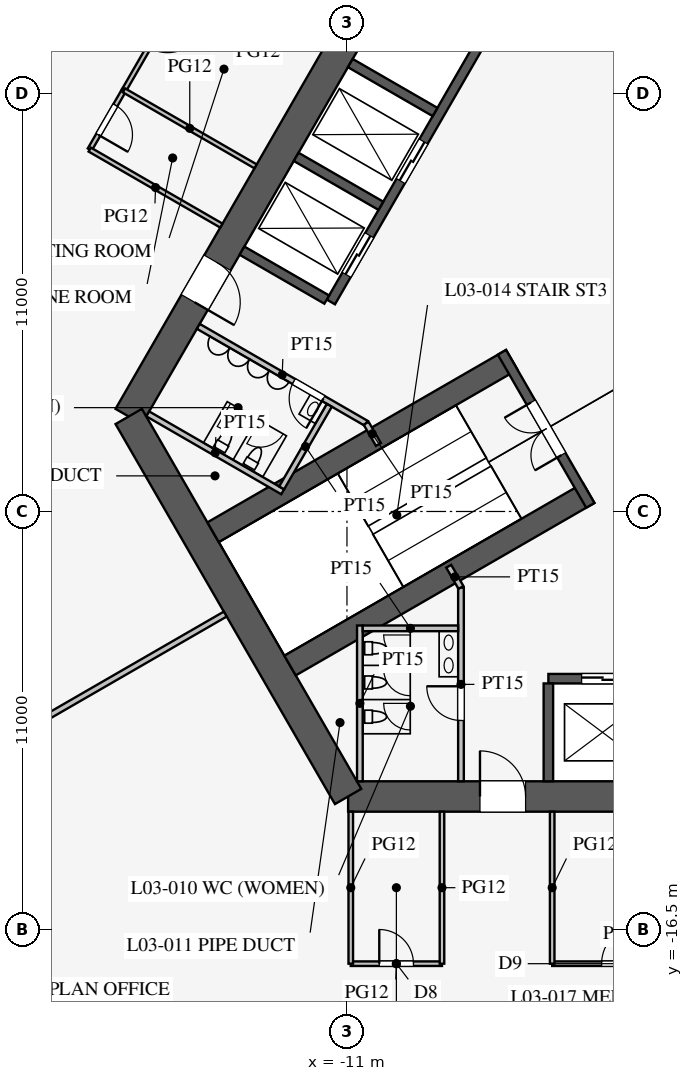
"""IFC4 building model, lengths in metres.
Left out: names, types, materials, properties, quantities, classifications, styles, units other than length and angle.
Written with IfcOpenShell. Run it as: python <this file> out.ifc"""

import sys

from ifc_helpers import new_model, si_unit, direction, frame, frame_2d, origin, place, context, subcontext, project, spatial, rectangle, extrude, element, fill, save


model = new_model("IFC4")
c1 = context("Model", 3, precision=1e-05, world=origin(), true_north=direction((0.0, 1.0)))
c2 = subcontext(c1, "Body", "Model", "MODEL_VIEW")
j1 = project(units=[si_unit("LENGTHUNIT", "METRE"), si_unit("PLANEANGLEUNIT", "RADIAN")], contexts=[c1])
p1 = place(None, origin())
s1 = spatial("IfcSite", under=j1, at=p1, CompositionType="ELEMENT")
p2 = place(p1, origin())
s2 = spatial("IfcBuilding", under=s1, at=p2, CompositionType="ELEMENT")
p3 = place(p2, frame((0.0, 0.0, 16.5)))
s3 = spatial("IfcBuildingStorey", under=s2, at=p3, CompositionType="ELEMENT", Elevation=16.5)
p4 = place(p3, frame((-10.97, -13.0, 0.0), z_axis=(0.0, 0.0, 1.0), x_axis=(1.0, 0.0, 0.0)))
e1 = element("IfcWall", 1, at=p4, inside=s3, PredefinedType="SHEAR", context=c2, shape_type="SweptSolid", body=[
    extrude(rectangle(XDim=21.939, YDim=0.8, at=frame_2d((10.97, 0.0))), origin(), (0.0, 0.0, 1.0), 4.2),
])
p5 = place(p4, frame((17.27, 0.0, 0.0)))
e2 = element("IfcOpeningElement", 2, at=p5, cuts=e1, PredefinedType="OPENING", context=c2, shape_type="SweptSolid", body=[
    extrude(rectangle(XDim=1.2, YDim=2.1, at=frame_2d((0.6, 1.05))), frame((0.0, 0.41, 0.0), z_axis=(0.0, -1.0, 0.0), x_axis=(1.0, 0.0, 0.0)), (0.0, 0.0, 1.0), 0.82),
])
p6 = place(p4, frame((3.47, 0.0, 0.0)))
e3 = element("IfcOpeningElement", 3, at=p6, cuts=e1, PredefinedType="OPENING", context=c2, shape_type="SweptSolid", body=[
    extrude(rectangle(XDim=1.2, YDim=2.1, at=frame_2d((0.6, 1.05))), frame((0.0, 0.41, 0.0), z_axis=(0.0, -1.0, 0.0), x_axis=(1.0, 0.0, 0.0)), (0.0, 0.0, 1.0), 0.82),
])
p7 = place(p3, frame((-5.773, 16.0, 0.0), z_axis=(0.0, 0.0, 1.0), x_axis=(-0.500002442456, -0.866023993627, 0.0)))
e4 = element("IfcWall", 4, at=p7, inside=s3, PredefinedType="SHEAR", context=c2, shape_type="SweptSolid", body=[
    extrude(rectangle(XDim=21.939, YDim=0.8, at=frame_2d((10.97, 0.0))), origin(), (0.0, 0.0, 1.0), 4.2),
])
p8 = place(p7, frame((17.27, 0.0, 0.0)))
e5 = element("IfcOpeningElement", 5, at=p8, cuts=e4, PredefinedType="OPENING", context=c2, shape_type="SweptSolid", body=[
    extrude(rectangle(XDim=1.2, YDim=2.1, at=frame_2d((0.6, 1.05))), frame((0.0, 0.41, 0.0), z_axis=(0.0, -1.0, 0.0), x_axis=(1.0, 0.0, 0.0)), (0.0, 0.0, 1.0), 0.82),
])
p9 = place(p7, frame((3.47, 0.0, 0.0)))
e6 = element("IfcOpeningElement", 6, at=p9, cuts=e4, PredefinedType="OPENING", context=c2, shape_type="SweptSolid", body=[
    extrude(rectangle(XDim=1.2, YDim=2.1, at=frame_2d((0.6, 1.05))), frame((0.0, 0.41, 0.0), z_axis=(0.0, -1.0, 0.0), x_axis=(1.0, 0.0, 0.0)), (0.0, 0.0, 1.0), 0.82),
])
p10 = place(p3, frame((-16.743, -3.0, 0.0), z_axis=(0.0, 0.0, 1.0), x_axis=(0.499995765644, -0.866027848477, 0.0)))
e7 = element("IfcWall", 7, at=p10, inside=s3, PredefinedType="SHEAR", context=c2, shape_type="SweptSolid", body=[
    extrude(rectangle(XDim=11.547, YDim=0.8, at=frame_2d((5.773, 0.0))), origin(), (0.0, 0.0, 1.0), 4.2),
])
p11 = place(p3, frame((-5.7, -9.9, 0.0), z_axis=(0.0, 0.0, 1.0), x_axis=(1.0, 0.0, 0.0)))
e8 = element("IfcWall", 8, at=p11, inside=s3, PredefinedType="SHEAR", context=c2, shape_type="SweptSolid", body=[
    extrude(rectangle(XDim=11.4, YDim=0.25, at=frame_2d((5.7, 0.0))), origin(), (0.0, 0.0, 1.0), 4.2),
])
p12 = place(p11, frame((0.875, 0.0, 0.0)))
e9 = element("IfcOpeningElement", 9, at=p12, cuts=e8, PredefinedType="OPENING", context=c2, shape_type="SweptSolid", body=[
    extrude(rectangle(XDim=1.1, YDim=2.2, at=frame_2d((0.55, 1.1))), frame((0.0, 0.135, 0.0), z_axis=(0.0, -1.0, 0.0), x_axis=(1.0, 0.0, 0.0)), (0.0, 0.0, 1.0), 0.27),
])
p13 = place(p11, frame((3.725, 0.0, 0.0)))
e10 = element("IfcOpeningElement", 10, at=p13, cuts=e8, PredefinedType="OPENING", context=c2, shape_type="SweptSolid", body=[
    extrude(rectangle(XDim=1.1, YDim=2.2, at=frame_2d((0.55, 1.1))), frame((0.0, 0.135, 0.0), z_axis=(0.0, -1.0, 0.0), x_axis=(1.0, 0.0, 0.0)), (0.0, 0.0, 1.0), 0.27),
])
p14 = place(p11, frame((6.575, 0.0, 0.0)))
e11 = element("IfcOpeningElement", 11, at=p14, cuts=e8, PredefinedType="OPENING", context=c2, shape_type="SweptSolid", body=[
    extrude(rectangle(XDim=1.1, YDim=2.2, at=frame_2d((0.55, 1.1))), frame((0.0, 0.135, 0.0), z_axis=(0.0, -1.0, 0.0), x_axis=(1.0, 0.0, 0.0)), (0.0, 0.0, 1.0), 0.27),
])
p15 = place(p11, frame((9.425, 0.0, 0.0)))
e12 = element("IfcOpeningElement", 12, at=p15, cuts=e8, PredefinedType="OPENING", context=c2, shape_type="SweptSolid", body=[
    extrude(rectangle(XDim=1.1, YDim=2.2, at=frame_2d((0.55, 1.1))), frame((0.0, 0.135, 0.0), z_axis=(0.0, -1.0, 0.0), x_axis=(1.0, 0.0, 0.0)), (0.0, 0.0, 1.0), 0.27),
])
p16 = place(p3, frame((-5.7, -10.025, 0.0), z_axis=(0.0, 0.0, 1.0), x_axis=(0.0, -1.0, 0.0)))
e13 = element("IfcWall", 13, at=p16, inside=s3, PredefinedType="SHEAR", context=c2, shape_type="SweptSolid", body=[
    extrude(rectangle(XDim=2.575, YDim=0.25, at=frame_2d((1.288, 0.0))), origin(), (0.0, 0.0, 1.0), 4.2),
])
p17 = place(p3, frame((-5.724, 9.886, 0.0), z_axis=(0.0, 0.0, 1.0), x_axis=(-0.500001763848, -0.866024385424, 0.0)))
e14 = element("IfcWall", 14, at=p17, inside=s3, PredefinedType="SHEAR", context=c2, shape_type="SweptSolid", body=[
    extrude(rectangle(XDim=11.4, YDim=0.25, at=frame_2d((5.7, 0.0))), origin(), (0.0, 0.0, 1.0), 4.2),
])
p18 = place(p17, frame((6.525, 0.0, 0.0)))
e15 = element("IfcOpeningElement", 15, at=p18, cuts=e14, PredefinedType="OPENING", context=c2, shape_type="SweptSolid", body=[
    extrude(rectangle(XDim=1.2, YDim=2.2, at=frame_2d((0.6, 1.1))), frame((0.0, 0.135, 0.0), z_axis=(0.0, -1.0, 0.0), x_axis=(1.0, 0.0, 0.0)), (0.0, 0.0, 1.0), 0.27),
])
p19 = place(p17, frame((9.375, 0.0, 0.0)))
e16 = element("IfcOpeningElement", 16, at=p19, cuts=e14, PredefinedType="OPENING", context=c2, shape_type="SweptSolid", body=[
    extrude(rectangle(XDim=1.2, YDim=2.2, at=frame_2d((0.6, 1.1))), frame((0.0, 0.135, 0.0), z_axis=(0.0, -1.0, 0.0), x_axis=(1.0, 0.0, 0.0)), (0.0, 0.0, 1.0), 0.27),
])
for number, where, z_axis, x_axis in (
    (17, (-8.682, 5.012, 0.0), (0.0, 0.0, 1.0), (-0.866, 0.5, 0.0)),
    (18, (-10.107, 2.544, 0.0), (0.0, 0.0, 1.0), (-0.866, 0.5, 0.0)),
    (19, (-11.532, 0.076, 0.0), (0.0, 0.0, 1.0), (-0.866, 0.5, 0.0)),
):
    element("IfcWall", number, at=place(p3, frame(where, z_axis=z_axis, x_axis=x_axis)), inside=s3, PredefinedType="SHEAR", context=c2, shape_type="SweptSolid", body=[
        extrude(rectangle(XDim=2.575, YDim=0.25, at=frame_2d((1.288, 0.0))), origin(), (0.0, 0.0, 1.0), 4.2),
    ])
for number, where, z_axis, x_axis in (
    (20, (-6.663, -1.509, 0.0), (0.0, 0.0, 1.0), (-0.866, -0.5, 0.0)),
    (21, (-4.638, -5.016, 0.0), (0.0, 0.0, 1.0), (-0.866, -0.5, 0.0)),
):
    element("IfcWall", number, at=place(p3, frame(where, z_axis=z_axis, x_axis=x_axis)), inside=s3, PredefinedType="SHEAR", context=c2, shape_type="SweptSolid", body=[
        extrude(rectangle(XDim=9.075, YDim=0.6, at=frame_2d((4.538, 0.0))), origin(), (0.0, 0.0, 1.0), 4.2),
    ])
p20 = place(p3, frame((-6.922, -1.312, 0.0), z_axis=(0.0, 0.0, 1.0), x_axis=(0.499984536904, -0.866034331223, 0.0)))
e22 = element("IfcWall", 22, at=p20, inside=s3, PredefinedType="SHEAR", context=c2, shape_type="SweptSolid", body=[
    extrude(rectangle(XDim=4.65, YDim=0.25, at=frame_2d((2.325, 0.0))), origin(), (0.0, 0.0, 1.0), 4.2),
])
p21 = place(p20, frame((1.525, 0.0, 0.0)))
e23 = element("IfcOpeningElement", 23, at=p21, cuts=e22, PredefinedType="OPENING", context=c2, shape_type="SweptSolid", body=[
    extrude(rectangle(XDim=1.6, YDim=2.1, at=frame_2d((0.8, 1.05))), frame((0.0, 0.135, 0.0), z_axis=(0.0, -1.0, 0.0), x_axis=(1.0, 0.0, 0.0)), (0.0, 0.0, 1.0), 0.27),
])
p22 = place(p3, frame((-8.0, -7.5, 0.0), z_axis=(0.0, 0.0, 1.0), x_axis=(0.0, -1.0, 0.0)))
e24 = element("IfcWall", 24, at=p22, inside=s3, PredefinedType="PARTITIONING", context=c2, shape_type="SweptSolid", body=[
    extrude(rectangle(XDim=5.1, YDim=0.15, at=frame_2d((2.55, 0.0))), origin(), (0.0, 0.0, 1.0), 4.0),
])
p23 = place(p22, frame((2.6, 0.0, 0.0)))
e25 = element("IfcOpeningElement", 25, at=p23, cuts=e24, PredefinedType="OPENING", context=c2, shape_type="SweptSolid", body=[
    extrude(rectangle(XDim=0.9, YDim=2.1, at=frame_2d((0.45, 1.05))), frame((0.0, 0.085, 0.0), z_axis=(0.0, -1.0, 0.0), x_axis=(1.0, 0.0, 0.0)), (0.0, 0.0, 1.0), 0.17),
])
p24 = place(p3, frame((-10.495, -3.178, 0.0), z_axis=(0.0, 0.0, 1.0), x_axis=(-0.86602216432, 0.500005610874, 0.0)))
e26 = element("IfcWall", 26, at=p24, inside=s3, PredefinedType="PARTITIONING", context=c2, shape_type="SweptSolid", body=[
    extrude(rectangle(XDim=5.1, YDim=0.15, at=frame_2d((2.55, 0.0))), origin(), (0.0, 0.0, 1.0), 4.0),
])
p25 = place(p24, frame((1.3, 0.0, 0.0)))
e27 = element("IfcOpeningElement", 27, at=p25, cuts=e26, PredefinedType="OPENING", context=c2, shape_type="SweptSolid", body=[
    extrude(rectangle(XDim=0.9, YDim=2.1, at=frame_2d((0.45, 1.05))), frame((0.0, 0.085, 0.0), z_axis=(0.0, -1.0, 0.0), x_axis=(1.0, 0.0, 0.0)), (0.0, 0.0, 1.0), 0.17),
])
for number, where, z_axis, x_axis in (
    (28, (-10.495, -3.178, 0.0), (0.0, 0.0, 1.0), (0.5, -0.866, 0.0)),
    (29, (-8.0, -7.5, 0.0), (0.0, 0.0, 1.0), (-0.5, 0.866, 0.0)),
):
    element("IfcWall", number, at=place(p3, frame(where, z_axis=z_axis, x_axis=x_axis)), inside=s3, PredefinedType="PARTITIONING", context=c2, shape_type="SweptSolid", body=[
        extrude(rectangle(XDim=0.645, YDim=0.15, at=frame_2d((0.323, 0.0))), origin(), (0.0, 0.0, 1.0), 4.0),
    ])
p26 = place(p3, frame((-12.691, -4.982, 0.0), z_axis=(0.0, 0.0, 1.0), x_axis=(-0.8660249478, 0.500000789788, 0.0)))
e30 = element("IfcWall", 30, at=p26, inside=s3, PredefinedType="PARTITIONING", context=c2, shape_type="SweptSolid", body=[
    extrude(rectangle(XDim=4.1, YDim=0.15, at=frame_2d((2.05, 0.0))), origin(), (0.0, 0.0, 1.0), 4.0),
])
p27 = place(p3, frame((-11.464, -2.706, 0.0), z_axis=(0.0, 0.0, 1.0), x_axis=(-0.50001992892, -0.866013897511, 0.0)))
e31 = element("IfcWall", 31, at=p27, inside=s3, PredefinedType="PARTITIONING", context=c2, shape_type="SweptSolid", body=[
    extrude(rectangle(XDim=2.51, YDim=0.15, at=frame_2d((1.255, 0.0))), origin(), (0.0, 0.0, 1.0), 4.0),
])
p28 = place(p3, frame((-10.66, -8.5, 0.0), z_axis=(0.0, 0.0, 1.0), x_axis=(0.0, -1.0, 0.0)))
e32 = element("IfcWall", 32, at=p28, inside=s3, PredefinedType="PARTITIONING", context=c2, shape_type="SweptSolid", body=[
    extrude(rectangle(XDim=4.1, YDim=0.15, at=frame_2d((2.05, 0.0))), origin(), (0.0, 0.0, 1.0), 4.0),
])
p29 = place(p3, frame((-8.075, -8.575, 0.0), z_axis=(0.0, 0.0, 1.0), x_axis=(-1.0, 0.0, 0.0)))
e33 = element("IfcWall", 33, at=p29, inside=s3, PredefinedType="PARTITIONING", context=c2, shape_type="SweptSolid", body=[
    extrude(rectangle(XDim=2.51, YDim=0.15, at=frame_2d((1.255, 0.0))), origin(), (0.0, 0.0, 1.0), 4.0),
])
p30 = place(p3, frame((-14.203, -8.2, 0.0), z_axis=(0.0, 0.0, 1.0), x_axis=(-0.866024965723, -0.500000758745, 0.0)))
e34 = element("IfcWall", 34, at=p30, inside=s3, PredefinedType="PARTITIONING", context=c2, shape_type="SweptSolid", body=[
    extrude(rectangle(XDim=18.25, YDim=0.15, at=frame_2d((9.125, 0.0))), origin(), (0.0, 0.0, 1.0), 2.3),
])
p31 = place(p3, frame((-10.9, -17.4, 0.0), z_axis=(0.0, 0.0, 1.0), x_axis=(1.0, 0.0, 0.0)))
e35 = element("IfcWall", 35, at=p31, inside=s3, PredefinedType="PARTITIONING", context=c2, shape_type="SweptSolid", body=[
    extrude(rectangle(XDim=2.4, YDim=0.12, at=frame_2d((1.2, 0.0))), origin(), (0.0, 0.0, 1.0), 2.9),
])
p32 = place(p31, frame((0.75, 0.0, 0.15)))
e36 = element("IfcOpeningElement", 36, at=p32, cuts=e35, PredefinedType="OPENING", context=c2, shape_type="SweptSolid", body=[
    extrude(rectangle(XDim=0.9, YDim=2.1, at=frame_2d((0.45, 1.05))), frame((0.0, 0.07, 0.0), z_axis=(0.0, -1.0, 0.0), x_axis=(1.0, 0.0, 0.0)), (0.0, 0.0, 1.0), 0.14),
])
p33 = place(p3, frame((-5.6, -17.4, 0.0), z_axis=(0.0, 0.0, 1.0), x_axis=(1.0, 0.0, 0.0)))
e37 = element("IfcWall", 37, at=p33, inside=s3, PredefinedType="PARTITIONING", context=c2, shape_type="SweptSolid", body=[
    extrude(rectangle(XDim=3.6, YDim=0.12, at=frame_2d((1.8, 0.0))), origin(), (0.0, 0.0, 1.0), 2.9),
])
p34 = place(p33, frame((1.3, 0.0, 0.15)))
e38 = element("IfcOpeningElement", 38, at=p34, cuts=e37, PredefinedType="OPENING", context=c2, shape_type="SweptSolid", body=[
    extrude(rectangle(XDim=1.0, YDim=2.1, at=frame_2d((0.5, 1.05))), frame((0.0, 0.07, 0.0), z_axis=(0.0, -1.0, 0.0), x_axis=(1.0, 0.0, 0.0)), (0.0, 0.0, 1.0), 0.14),
])
for number, where, z_axis, x_axis in (
    (39, (-10.9, -13.4, 0.0), (0.0, 0.0, 1.0), (0.0, -1.0, 0.0)),
    (40, (-5.6, -13.4, 0.0), (0.0, 0.0, 1.0), (0.0, -1.0, 0.0)),
    (41, (-8.5, -13.4, 0.0), (0.0, 0.0, 1.0), (0.0, -1.0, 0.0)),
):
    element("IfcWall", number, at=place(p3, frame(where, z_axis=z_axis, x_axis=x_axis)), inside=s3, PredefinedType="PARTITIONING", context=c2, shape_type="SweptSolid", body=[
        extrude(rectangle(XDim=4.0, YDim=0.12, at=frame_2d((2.0, 0.0))), origin(), (0.0, 0.0, 1.0), 2.9),
    ])
p35 = place(p3, frame((-16.869, 5.582, 0.0), z_axis=(0.0, 0.0, 1.0), x_axis=(-0.499961193289, -0.866047807691, 0.0)))
e42 = element("IfcWall", 42, at=p35, inside=s3, PredefinedType="PARTITIONING", context=c2, shape_type="SweptSolid", body=[
    extrude(rectangle(XDim=1.8, YDim=0.12, at=frame_2d((0.9, 0.0))), origin(), (0.0, 0.0, 1.0), 2.9),
])
p36 = place(p35, frame((0.45, 0.0, 0.15)))
e43 = element("IfcOpeningElement", 43, at=p36, cuts=e42, PredefinedType="OPENING", context=c2, shape_type="SweptSolid", body=[
    extrude(rectangle(XDim=0.9, YDim=2.1, at=frame_2d((0.45, 1.05))), frame((0.0, 0.07, 0.0), z_axis=(0.0, -1.0, 0.0), x_axis=(1.0, 0.0, 0.0)), (0.0, 0.0, 1.0), 0.14),
])
p37 = place(p3, frame((-15.069, 8.7, 0.0), z_axis=(0.0, 0.0, 1.0), x_axis=(-0.500012057535, -0.866018442252, 0.0)))
e44 = element("IfcWall", 44, at=p37, inside=s3, PredefinedType="PARTITIONING", context=c2, shape_type="SweptSolid", body=[
    extrude(rectangle(XDim=3.6, YDim=0.12, at=frame_2d((1.8, 0.0))), origin(), (0.0, 0.0, 1.0), 2.9),
])
p38 = place(p37, frame((1.3, 0.0, 0.15)))
e45 = element("IfcOpeningElement", 45, at=p38, cuts=e44, PredefinedType="OPENING", context=c2, shape_type="SweptSolid", body=[
    extrude(rectangle(XDim=1.0, YDim=2.1, at=frame_2d((0.5, 1.05))), frame((0.0, 0.07, 0.0), z_axis=(0.0, -1.0, 0.0), x_axis=(1.0, 0.0, 0.0)), (0.0, 0.0, 1.0), 0.14),
])
for number, where, z_axis, x_axis in (
    (46, (-13.405, 3.582, 0.0), (0.0, 0.0, 1.0), (-0.866, 0.5, 0.0)),
    (47, (-14.305, 2.023, 0.0), (0.0, 0.0, 1.0), (-0.866, 0.5, 0.0)),
):
    element("IfcWall", number, at=place(p3, frame(where, z_axis=z_axis, x_axis=x_axis)), inside=s3, PredefinedType="PARTITIONING", context=c2, shape_type="SweptSolid", body=[
        extrude(rectangle(XDim=4.0, YDim=0.12, at=frame_2d((2.0, 0.0))), origin(), (0.0, 0.0, 1.0), 2.9),
    ])
p39 = place(p23, frame((0.9, 0.0, 0.0), z_axis=(0.0, 0.0, 1.0), x_axis=(-1.0, 0.0, 0.0)))
e48 = element("IfcDoor", 48, at=p39, inside=s3, OperationType="SINGLE_SWING_RIGHT", PredefinedType="DOOR", context=c2, shape_type="SweptSolid", body=[
    extrude(rectangle(XDim=0.9, YDim=2.1, at=frame_2d((0.45, 1.05))), frame((0.0, 0.025, 0.0), z_axis=(0.0, -1.0, 0.0), x_axis=(1.0, 0.0, 0.0)), (0.0, 0.0, 1.0), 0.05),
])
fill(e25, e48)
p40 = place(p25, origin())
e49 = element("IfcDoor", 49, at=p40, inside=s3, OperationType="SINGLE_SWING_LEFT", PredefinedType="DOOR", context=c2, shape_type="SweptSolid", body=[
    extrude(rectangle(XDim=0.9, YDim=2.1, at=frame_2d((0.45, 1.05))), frame((0.0, 0.025, 0.0), z_axis=(0.0, -1.0, 0.0), x_axis=(1.0, 0.0, 0.0)), (0.0, 0.0, 1.0), 0.05),
])
fill(e27, e49)
p41 = place(p21, frame((1.6, 0.0, 0.0), z_axis=(0.0, 0.0, 1.0), x_axis=(-1.0, 0.0, 0.0)))
e50 = element("IfcDoor", 50, at=p41, inside=s3, OperationType="DOUBLE_DOOR_SINGLE_SWING", PredefinedType="DOOR", context=c2, shape_type="SweptSolid", body=[
    extrude(rectangle(XDim=1.6, YDim=2.1, at=frame_2d((0.8, 1.05))), frame((0.0, 0.025, 0.0), z_axis=(0.0, -1.0, 0.0), x_axis=(1.0, 0.0, 0.0)), (0.0, 0.0, 1.0), 0.05),
])
fill(e23, e50)
p42 = place(p6, origin())
e51 = element("IfcDoor", 51, at=p42, inside=s3, OperationType="SINGLE_SWING_LEFT", PredefinedType="DOOR", context=c2, shape_type="SweptSolid", body=[
    extrude(rectangle(XDim=1.2, YDim=2.1, at=frame_2d((0.6, 1.05))), frame((0.0, 0.025, 0.0), z_axis=(0.0, -1.0, 0.0), x_axis=(1.0, 0.0, 0.0)), (0.0, 0.0, 1.0), 0.05),
])
fill(e3, e51)
p43 = place(p8, origin())
e52 = element("IfcDoor", 52, at=p43, inside=s3, OperationType="SINGLE_SWING_RIGHT", PredefinedType="DOOR", context=c2, shape_type="SweptSolid", body=[
    extrude(rectangle(XDim=1.2, YDim=2.1, at=frame_2d((0.6, 1.05))), frame((0.0, 0.025, 0.0), z_axis=(0.0, -1.0, 0.0), x_axis=(1.0, 0.0, 0.0)), (0.0, 0.0, 1.0), 0.05),
])
fill(e5, e52)
p44 = place(p34, origin())
e53 = element("IfcDoor", 53, at=p44, inside=s3, OperationType="SINGLE_SWING_RIGHT", PredefinedType="DOOR", context=c2, shape_type="SweptSolid", body=[
    extrude(rectangle(XDim=1.0, YDim=2.1, at=frame_2d((0.5, 1.05))), frame((0.0, 0.025, 0.0), z_axis=(0.0, -1.0, 0.0), x_axis=(1.0, 0.0, 0.0)), (0.0, 0.0, 1.0), 0.05),
])
fill(e38, e53)
p45 = place(p32, origin())
e54 = element("IfcDoor", 54, at=p45, inside=s3, OperationType="SINGLE_SWING_LEFT", PredefinedType="DOOR", context=c2, shape_type="SweptSolid", body=[
    extrude(rectangle(XDim=0.9, YDim=2.1, at=frame_2d((0.45, 1.05))), frame((0.0, 0.025, 0.0), z_axis=(0.0, -1.0, 0.0), x_axis=(1.0, 0.0, 0.0)), (0.0, 0.0, 1.0), 0.05),
])
fill(e36, e54)
p46 = place(p36, origin())
e55 = element("IfcDoor", 55, at=p46, inside=s3, OperationType="SINGLE_SWING_RIGHT", PredefinedType="DOOR", context=c2, shape_type="SweptSolid", body=[
    extrude(rectangle(XDim=0.9, YDim=2.1, at=frame_2d((0.45, 1.05))), frame((0.0, 0.025, 0.0), z_axis=(0.0, -1.0, 0.0), x_axis=(1.0, 0.0, 0.0)), (0.0, 0.0, 1.0), 0.05),
])
fill(e43, e55)
p47 = place(p12, origin())
e56 = element("IfcDoor", 56, at=p47, inside=s3, OperationType="DOUBLE_DOOR_SLIDING", PredefinedType="DOOR", context=c2, shape_type="SweptSolid", body=[
    extrude(rectangle(XDim=1.1, YDim=2.2, at=frame_2d((0.55, 1.1))), frame((0.0, 0.025, 0.0), z_axis=(0.0, -1.0, 0.0), x_axis=(1.0, 0.0, 0.0)), (0.0, 0.0, 1.0), 0.05),
])
fill(e9, e56)
p48 = place(p18, origin())
e57 = element("IfcDoor", 57, at=p48, inside=s3, OperationType="DOUBLE_DOOR_SLIDING", PredefinedType="DOOR", context=c2, shape_type="SweptSolid", body=[
    extrude(rectangle(XDim=1.2, YDim=2.2, at=frame_2d((0.6, 1.1))), frame((0.0, 0.025, 0.0), z_axis=(0.0, -1.0, 0.0), x_axis=(1.0, 0.0, 0.0)), (0.0, 0.0, 1.0), 0.05),
])
fill(e15, e57)
p49 = place(p19, origin())
e58 = element("IfcDoor", 58, at=p49, inside=s3, OperationType="DOUBLE_DOOR_SLIDING", PredefinedType="DOOR", context=c2, shape_type="SweptSolid", body=[
    extrude(rectangle(XDim=1.2, YDim=2.2, at=frame_2d((0.6, 1.1))), frame((0.0, 0.025, 0.0), z_axis=(0.0, -1.0, 0.0), x_axis=(1.0, 0.0, 0.0)), (0.0, 0.0, 1.0), 0.05),
])
fill(e16, e58)
save(model, sys.argv[1])
